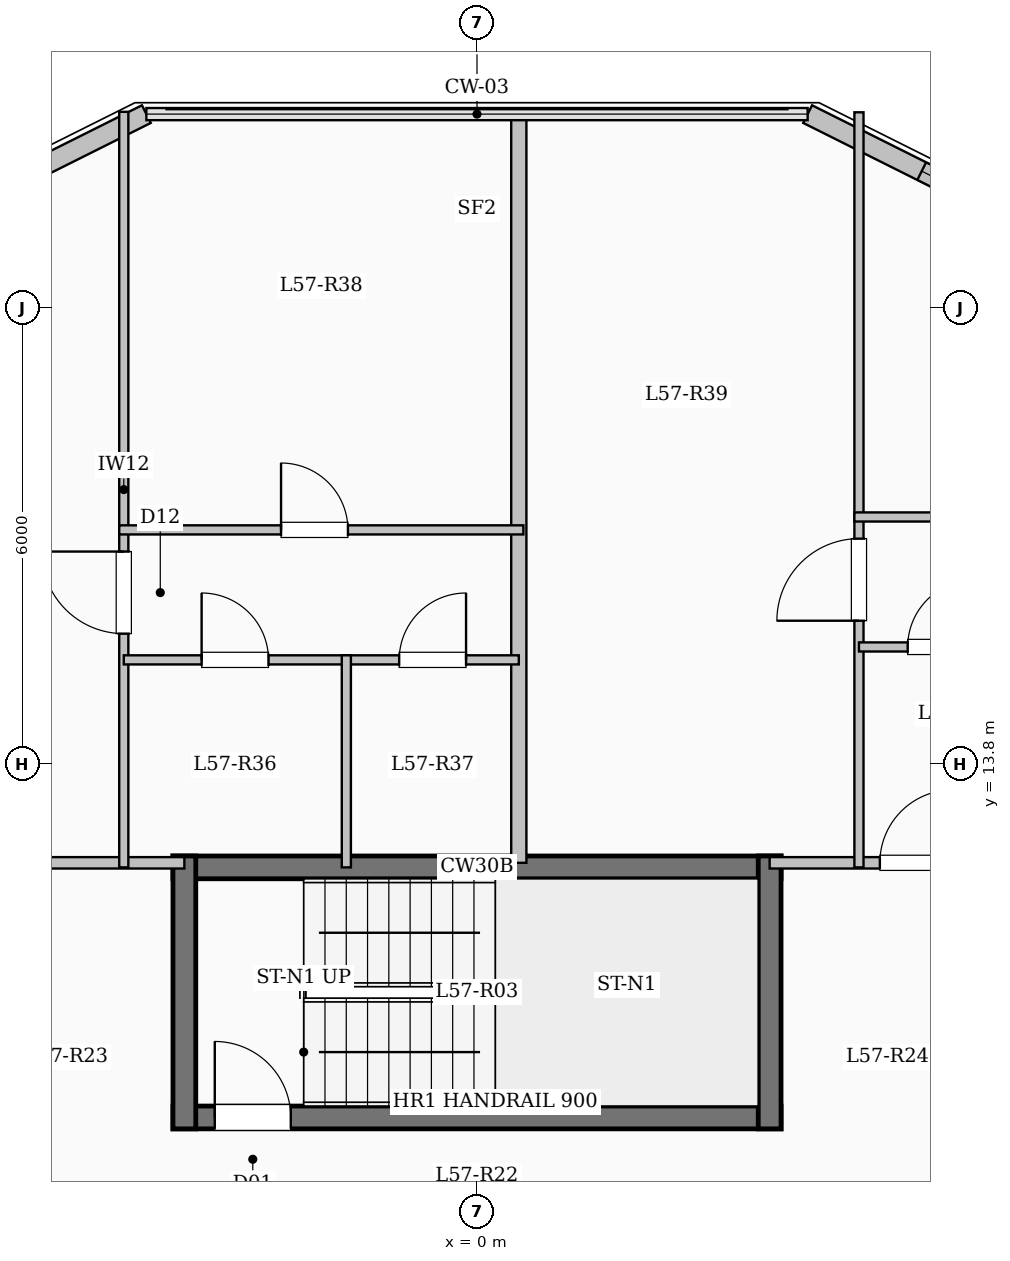
"""IFC4 building model, lengths in metres.
Left out: names, types, materials, properties, quantities, classifications, styles, units other than length and angle.
Written with IfcOpenShell. Run it as: python <this file> out.ifc"""

import sys

from ifc_helpers import new_model, si_unit, direction, frame, frame_2d, origin, place, context, subcontext, project, spatial, rectangle, extrude, element, fill, save


model = new_model("IFC4")
c1 = context("Model", 3, precision=1e-05, world=origin(), true_north=direction((0.0, 1.0)))
c2 = subcontext(c1, "Body", "Model", "MODEL_VIEW")
j1 = project(units=[si_unit("LENGTHUNIT", "METRE"), si_unit("PLANEANGLEUNIT", "RADIAN")], contexts=[c1])
p1 = place(None, origin())
s1 = spatial("IfcSite", under=j1, at=p1, CompositionType="ELEMENT")
p2 = place(p1, origin())
s2 = spatial("IfcBuilding", under=s1, at=p2, CompositionType="ELEMENT")
p3 = place(p2, frame((0.0, 0.0, 210.35)))
s3 = spatial("IfcBuildingStorey", under=s2, at=p3, CompositionType="ELEMENT", Elevation=210.35)
p4 = place(p3, frame((-7.35, 20.85, 0.0), z_axis=(0.0, 0.0, 1.0), x_axis=(0.894427191, 0.4472135955, 0.0)))
e1 = element("IfcWall", 1, at=p4, inside=s3, PredefinedType="SOLIDWALL", context=c2, shape_type="SweptSolid", body=[
    extrude(rectangle(XDim=3.354, YDim=0.26, at=frame_2d((1.677, 0.0))), origin(), (0.0, 0.0, 1.0), 3.1),
])
p5 = place(p4, frame((0.501, 0.0, 0.95)))
e2 = element("IfcOpeningElement", 2, at=p5, cuts=e1, PredefinedType="OPENING", context=c2, shape_type="SweptSolid", body=[
    extrude(rectangle(XDim=1.2, YDim=1.5, at=frame_2d((0.6, 0.75))), frame((0.0, 0.14, 0.0), z_axis=(0.0, -1.0, 0.0), x_axis=(1.0, 0.0, 0.0)), (0.0, 0.0, 1.0), 0.28),
])
p6 = place(p3, frame((4.35, 22.35, 0.0), z_axis=(0.0, 0.0, 1.0), x_axis=(0.894427191, -0.4472135955, 0.0)))
e3 = element("IfcWall", 3, at=p6, inside=s3, PredefinedType="SOLIDWALL", context=c2, shape_type="SweptSolid", body=[
    extrude(rectangle(XDim=3.354, YDim=0.26, at=frame_2d((1.677, 0.0))), origin(), (0.0, 0.0, 1.0), 3.1),
])
p7 = place(p6, frame((1.678, 0.0, 0.95)))
e4 = element("IfcOpeningElement", 4, at=p7, cuts=e3, PredefinedType="OPENING", context=c2, shape_type="SweptSolid", body=[
    extrude(rectangle(XDim=1.2, YDim=1.5, at=frame_2d((0.6, 0.75))), frame((0.0, 0.14, 0.0), z_axis=(0.0, -1.0, 0.0), x_axis=(1.0, 0.0, 0.0)), (0.0, 0.0, 1.0), 0.28),
])
p8 = place(p3, frame((-4.0, 12.44, 0.0), z_axis=(0.0, 0.0, 1.0), x_axis=(1.0, 0.0, 0.0)))
e5 = element("IfcWall", 5, at=p8, inside=s3, PredefinedType="SHEAR", context=c2, shape_type="SweptSolid", body=[
    extrude(rectangle(XDim=8.0, YDim=0.3, at=frame_2d((4.0, 0.0))), origin(), (0.0, 0.0, 1.0), 3.35),
])
p9 = place(p3, frame((-4.0, 9.15, 0.0), z_axis=(0.0, 0.0, 1.0), x_axis=(1.0, 0.0, 0.0)))
e6 = element("IfcWall", 6, at=p9, inside=s3, PredefinedType="SHEAR", context=c2, shape_type="SweptSolid", body=[
    extrude(rectangle(XDim=8.0, YDim=0.3, at=frame_2d((4.0, 0.0))), origin(), (0.0, 0.0, 1.0), 3.35),
])
p10 = place(p9, frame((0.55, 0.0, 0.0)))
e7 = element("IfcOpeningElement", 7, at=p10, cuts=e6, PredefinedType="OPENING", context=c2, shape_type="SweptSolid", body=[
    extrude(rectangle(XDim=1.0, YDim=2.15, at=frame_2d((0.5, 1.075))), frame((0.0, 0.16, 0.0), z_axis=(0.0, -1.0, 0.0), x_axis=(1.0, 0.0, 0.0)), (0.0, 0.0, 1.0), 0.32),
])
for number, where, z_axis, x_axis in (
    (8, (-3.85, 9.0, 0.0), (0.0, 0.0, 1.0), (0.0, 1.0, 0.0)),
    (9, (3.85, 9.0, 0.0), (0.0, 0.0, 1.0), (0.0, 1.0, 0.0)),
):
    element("IfcWall", number, at=place(p3, frame(where, z_axis=z_axis, x_axis=x_axis)), inside=s3, PredefinedType="SHEAR", context=c2, shape_type="SweptSolid", body=[
        extrude(rectangle(XDim=3.59, YDim=0.3, at=frame_2d((1.795, 0.0))), origin(), (0.0, 0.0, 1.0), 3.35),
    ])
p11 = place(p3, frame((-18.35, 12.5, 0.0), z_axis=(0.0, 0.0, 1.0), x_axis=(1.0, 0.0, 0.0)))
e10 = element("IfcWall", 10, at=p11, inside=s3, PredefinedType="PARTITIONING", context=c2, shape_type="SweptSolid", body=[
    extrude(rectangle(XDim=14.5, YDim=0.15, at=frame_2d((7.25, 0.0))), origin(), (0.0, 0.0, 1.0), 3.1),
])
p12 = place(p11, frame((0.7, 0.0, 0.0)))
e11 = element("IfcOpeningElement", 11, at=p12, cuts=e10, PredefinedType="OPENING", context=c2, shape_type="SweptSolid", body=[
    extrude(rectangle(XDim=0.96, YDim=2.15, at=frame_2d((0.48, 1.075))), frame((0.0, 0.085, 0.0), z_axis=(0.0, -1.0, 0.0), x_axis=(1.0, 0.0, 0.0)), (0.0, 0.0, 1.0), 0.17),
])
p13 = place(p11, frame((9.205, 0.0, 0.0)))
e12 = element("IfcOpeningElement", 12, at=p13, cuts=e10, PredefinedType="OPENING", context=c2, shape_type="SweptSolid", body=[
    extrude(rectangle(XDim=0.96, YDim=2.15, at=frame_2d((0.48, 1.075))), frame((0.0, 0.085, 0.0), z_axis=(0.0, -1.0, 0.0), x_axis=(1.0, 0.0, 0.0)), (0.0, 0.0, 1.0), 0.17),
])
p14 = place(p3, frame((3.85, 12.5, 0.0), z_axis=(0.0, 0.0, 1.0), x_axis=(1.0, 0.0, 0.0)))
e13 = element("IfcWall", 13, at=p14, inside=s3, PredefinedType="PARTITIONING", context=c2, shape_type="SweptSolid", body=[
    extrude(rectangle(XDim=14.5, YDim=0.15, at=frame_2d((7.25, 0.0))), origin(), (0.0, 0.0, 1.0), 3.1),
])
p15 = place(p14, frame((1.45, 0.0, 0.0)))
e14 = element("IfcOpeningElement", 14, at=p15, cuts=e13, PredefinedType="OPENING", context=c2, shape_type="SweptSolid", body=[
    extrude(rectangle(XDim=0.96, YDim=2.15, at=frame_2d((0.48, 1.075))), frame((0.0, 0.085, 0.0), z_axis=(0.0, -1.0, 0.0), x_axis=(1.0, 0.0, 0.0)), (0.0, 0.0, 1.0), 0.17),
])
p16 = place(p14, frame((6.35, 0.0, 0.0)))
e15 = element("IfcOpeningElement", 15, at=p16, cuts=e13, PredefinedType="OPENING", context=c2, shape_type="SweptSolid", body=[
    extrude(rectangle(XDim=0.96, YDim=2.15, at=frame_2d((0.48, 1.075))), frame((0.0, 0.085, 0.0), z_axis=(0.0, -1.0, 0.0), x_axis=(1.0, 0.0, 0.0)), (0.0, 0.0, 1.0), 0.17),
])
p17 = place(p3, frame((0.55, 12.5, 0.0), z_axis=(0.0, 0.0, 1.0), x_axis=(0.0, 1.0, 0.0)))
e16 = element("IfcWall", 16, at=p17, inside=s3, PredefinedType="SOLIDWALL", context=c2, shape_type="SweptSolid", body=[
    extrude(rectangle(XDim=9.88, YDim=0.2, at=frame_2d((4.94, 0.0))), origin(), (0.0, 0.0, 1.0), 3.1),
])
p18 = place(p3, frame((-4.647, 12.44, 0.0), z_axis=(0.0, 0.0, 1.0), x_axis=(0.0, 1.0, 0.0)))
e17 = element("IfcWall", 17, at=p18, inside=s3, PredefinedType="PARTITIONING", context=c2, shape_type="SweptSolid", body=[
    extrude(rectangle(XDim=9.94, YDim=0.12, at=frame_2d((4.97, 0.0))), origin(), (0.0, 0.0, 1.0), 3.1),
])
p19 = place(p18, frame((3.075, 0.0, 0.0)))
e18 = element("IfcOpeningElement", 18, at=p19, cuts=e17, PredefinedType="OPENING", context=c2, shape_type="SweptSolid", body=[
    extrude(rectangle(XDim=1.08, YDim=2.15, at=frame_2d((0.54, 1.075))), frame((0.0, 0.07, 0.0), z_axis=(0.0, -1.0, 0.0), x_axis=(1.0, 0.0, 0.0)), (0.0, 0.0, 1.0), 0.14),
])
p20 = place(p3, frame((-4.647, 15.17, 0.0), z_axis=(0.0, 0.0, 1.0), x_axis=(1.0, 0.0, 0.0)))
e19 = element("IfcWall", 19, at=p20, inside=s3, PredefinedType="PARTITIONING", context=c2, shape_type="SweptSolid", body=[
    extrude(rectangle(XDim=2.928, YDim=0.12, at=frame_2d((1.464, 0.0))), origin(), (0.0, 0.0, 1.0), 3.1),
])
p21 = place(p20, frame((1.024, 0.0, 0.0)))
e20 = element("IfcOpeningElement", 20, at=p21, cuts=e19, PredefinedType="OPENING", context=c2, shape_type="SweptSolid", body=[
    extrude(rectangle(XDim=0.88, YDim=2.1, at=frame_2d((0.44, 1.05))), frame((0.0, 0.07, 0.0), z_axis=(0.0, -1.0, 0.0), x_axis=(1.0, 0.0, 0.0)), (0.0, 0.0, 1.0), 0.14),
])
p22 = place(p3, frame((-1.719, 15.17, 0.0), z_axis=(0.0, 0.0, 1.0), x_axis=(1.0, 0.0, 0.0)))
e21 = element("IfcWall", 21, at=p22, inside=s3, PredefinedType="PARTITIONING", context=c2, shape_type="SweptSolid", body=[
    extrude(rectangle(XDim=2.269, YDim=0.12, at=frame_2d((1.135, 0.0))), origin(), (0.0, 0.0, 1.0), 3.1),
])
p23 = place(p22, frame((0.695, 0.0, 0.0)))
e22 = element("IfcOpeningElement", 22, at=p23, cuts=e21, PredefinedType="OPENING", context=c2, shape_type="SweptSolid", body=[
    extrude(rectangle(XDim=0.88, YDim=2.1, at=frame_2d((0.44, 1.05))), frame((0.0, 0.07, 0.0), z_axis=(0.0, -1.0, 0.0), x_axis=(1.0, 0.0, 0.0)), (0.0, 0.0, 1.0), 0.14),
])
p24 = place(p3, frame((-4.707, 16.88, 0.0), z_axis=(0.0, 0.0, 1.0), x_axis=(1.0, 0.0, 0.0)))
e23 = element("IfcWall", 23, at=p24, inside=s3, PredefinedType="PARTITIONING", context=c2, shape_type="SweptSolid", body=[
    extrude(rectangle(XDim=5.317, YDim=0.12, at=frame_2d((2.659, 0.0))), origin(), (0.0, 0.0, 1.0), 2.725),
])
p25 = place(p24, frame((2.129, 0.0, 0.0)))
e24 = element("IfcOpeningElement", 24, at=p25, cuts=e23, PredefinedType="OPENING", context=c2, shape_type="SweptSolid", body=[
    extrude(rectangle(XDim=0.88, YDim=2.1, at=frame_2d((0.44, 1.05))), frame((0.0, 0.07, 0.0), z_axis=(0.0, -1.0, 0.0), x_axis=(1.0, 0.0, 0.0)), (0.0, 0.0, 1.0), 0.14),
])
p26 = place(p3, frame((-1.719, 12.44, 0.0), z_axis=(0.0, 0.0, 1.0), x_axis=(0.0, 1.0, 0.0)))
e25 = element("IfcWall", 25, at=p26, inside=s3, PredefinedType="PARTITIONING", context=c2, shape_type="SweptSolid", body=[
    extrude(rectangle(XDim=2.79, YDim=0.12, at=frame_2d((1.395, 0.0))), origin(), (0.0, 0.0, 1.0), 3.1),
])
p27 = place(p3, frame((5.025, 12.44, 0.0), z_axis=(0.0, 0.0, 1.0), x_axis=(0.0, 1.0, 0.0)))
e26 = element("IfcWall", 26, at=p27, inside=s3, PredefinedType="PARTITIONING", context=c2, shape_type="SweptSolid", body=[
    extrude(rectangle(XDim=9.934, YDim=0.12, at=frame_2d((4.967, 0.0))), origin(), (0.0, 0.0, 1.0), 3.1),
])
p28 = place(p27, frame((3.245, 0.0, 0.0)))
e27 = element("IfcOpeningElement", 27, at=p28, cuts=e26, PredefinedType="OPENING", context=c2, shape_type="SweptSolid", body=[
    extrude(rectangle(XDim=1.08, YDim=2.15, at=frame_2d((0.54, 1.075))), frame((0.0, 0.07, 0.0), z_axis=(0.0, -1.0, 0.0), x_axis=(1.0, 0.0, 0.0)), (0.0, 0.0, 1.0), 0.14),
])
p29 = place(p3, frame((5.025, 15.34, 0.0), z_axis=(0.0, 0.0, 1.0), x_axis=(1.0, 0.0, 0.0)))
e28 = element("IfcWall", 28, at=p29, inside=s3, PredefinedType="PARTITIONING", context=c2, shape_type="SweptSolid", body=[
    extrude(rectangle(XDim=2.163, YDim=0.12, at=frame_2d((1.082, 0.0))), origin(), (0.0, 0.0, 1.0), 2.725),
])
p30 = place(p29, frame((0.641, 0.0, 0.0)))
e29 = element("IfcOpeningElement", 29, at=p30, cuts=e28, PredefinedType="OPENING", context=c2, shape_type="SweptSolid", body=[
    extrude(rectangle(XDim=0.88, YDim=2.1, at=frame_2d((0.44, 1.05))), frame((0.0, 0.07, 0.0), z_axis=(0.0, -1.0, 0.0), x_axis=(1.0, 0.0, 0.0)), (0.0, 0.0, 1.0), 0.14),
])
p31 = place(p3, frame((4.965, 17.05, 0.0), z_axis=(0.0, 0.0, 1.0), x_axis=(1.0, 0.0, 0.0)))
e30 = element("IfcWall", 30, at=p31, inside=s3, PredefinedType="PARTITIONING", context=c2, shape_type="SweptSolid", body=[
    extrude(rectangle(XDim=4.595, YDim=0.12, at=frame_2d((2.297, 0.0))), origin(), (0.0, 0.0, 1.0), 2.725),
])
p32 = place(p31, frame((1.767, 0.0, 0.0)))
e31 = element("IfcOpeningElement", 31, at=p32, cuts=e30, PredefinedType="OPENING", context=c2, shape_type="SweptSolid", body=[
    extrude(rectangle(XDim=0.88, YDim=2.1, at=frame_2d((0.44, 1.05))), frame((0.0, 0.07, 0.0), z_axis=(0.0, -1.0, 0.0), x_axis=(1.0, 0.0, 0.0)), (0.0, 0.0, 1.0), 0.14),
])
p33 = place(p7, origin())
e32 = element("IfcWindow", 32, at=p33, inside=s3, PartitioningType="SINGLE_PANEL", PredefinedType="WINDOW", context=c2, shape_type="SweptSolid", body=[
    extrude(rectangle(XDim=1.2, YDim=1.5, at=frame_2d((0.6, 0.75))), frame((0.0, 0.03, 0.0), z_axis=(0.0, -1.0, 0.0), x_axis=(1.0, 0.0, 0.0)), (0.0, 0.0, 1.0), 0.06),
])
fill(e4, e32)
p34 = place(p10, origin())
e33 = element("IfcDoor", 33, at=p34, inside=s3, OperationType="SINGLE_SWING_LEFT", PredefinedType="DOOR", context=c2, shape_type="SweptSolid", body=[
    extrude(rectangle(XDim=1.0, YDim=2.15, at=frame_2d((0.5, 1.075))), frame((0.0, 0.025, 0.0), z_axis=(0.0, -1.0, 0.0), x_axis=(1.0, 0.0, 0.0)), (0.0, 0.0, 1.0), 0.05),
])
fill(e7, e33)
p35 = place(p19, origin())
e34 = element("IfcDoor", 34, at=p35, inside=s3, OperationType="SINGLE_SWING_RIGHT", PredefinedType="DOOR", context=c2, shape_type="SweptSolid", body=[
    extrude(rectangle(XDim=1.08, YDim=2.15, at=frame_2d((0.54, 1.075))), frame((0.0, 0.025, 0.0), z_axis=(0.0, -1.0, 0.0), x_axis=(1.0, 0.0, 0.0)), (0.0, 0.0, 1.0), 0.05),
])
fill(e18, e34)
p36 = place(p21, origin())
e35 = element("IfcDoor", 35, at=p36, inside=s3, OperationType="SINGLE_SWING_LEFT", PredefinedType="DOOR", context=c2, shape_type="SweptSolid", body=[
    extrude(rectangle(XDim=0.88, YDim=2.1, at=frame_2d((0.44, 1.05))), frame((0.0, 0.025, 0.0), z_axis=(0.0, -1.0, 0.0), x_axis=(1.0, 0.0, 0.0)), (0.0, 0.0, 1.0), 0.05),
])
fill(e20, e35)
p37 = place(p23, origin())
e36 = element("IfcDoor", 36, at=p37, inside=s3, OperationType="SINGLE_SWING_RIGHT", PredefinedType="DOOR", context=c2, shape_type="SweptSolid", body=[
    extrude(rectangle(XDim=0.88, YDim=2.1, at=frame_2d((0.44, 1.05))), frame((0.0, 0.025, 0.0), z_axis=(0.0, -1.0, 0.0), x_axis=(1.0, 0.0, 0.0)), (0.0, 0.0, 1.0), 0.05),
])
fill(e22, e36)
p38 = place(p25, origin())
e37 = element("IfcDoor", 37, at=p38, inside=s3, OperationType="SINGLE_SWING_LEFT", PredefinedType="DOOR", context=c2, shape_type="SweptSolid", body=[
    extrude(rectangle(XDim=0.88, YDim=2.1, at=frame_2d((0.44, 1.05))), frame((0.0, 0.025, 0.0), z_axis=(0.0, -1.0, 0.0), x_axis=(1.0, 0.0, 0.0)), (0.0, 0.0, 1.0), 0.05),
])
fill(e24, e37)
p39 = place(p15, origin())
e38 = element("IfcDoor", 38, at=p39, inside=s3, OperationType="SINGLE_SWING_RIGHT", PredefinedType="DOOR", context=c2, shape_type="SweptSolid", body=[
    extrude(rectangle(XDim=0.96, YDim=2.15, at=frame_2d((0.48, 1.075))), frame((0.0, 0.025, 0.0), z_axis=(0.0, -1.0, 0.0), x_axis=(1.0, 0.0, 0.0)), (0.0, 0.0, 1.0), 0.05),
])
fill(e14, e38)
p40 = place(p28, origin())
e39 = element("IfcDoor", 39, at=p40, inside=s3, OperationType="SINGLE_SWING_LEFT", PredefinedType="DOOR", context=c2, shape_type="SweptSolid", body=[
    extrude(rectangle(XDim=1.08, YDim=2.15, at=frame_2d((0.54, 1.075))), frame((0.0, 0.025, 0.0), z_axis=(0.0, -1.0, 0.0), x_axis=(1.0, 0.0, 0.0)), (0.0, 0.0, 1.0), 0.05),
])
fill(e27, e39)
p41 = place(p30, origin())
e40 = element("IfcDoor", 40, at=p41, inside=s3, OperationType="SINGLE_SWING_RIGHT", PredefinedType="DOOR", context=c2, shape_type="SweptSolid", body=[
    extrude(rectangle(XDim=0.88, YDim=2.1, at=frame_2d((0.44, 1.05))), frame((0.0, 0.025, 0.0), z_axis=(0.0, -1.0, 0.0), x_axis=(1.0, 0.0, 0.0)), (0.0, 0.0, 1.0), 0.05),
])
fill(e29, e40)
save(model, sys.argv[1])
